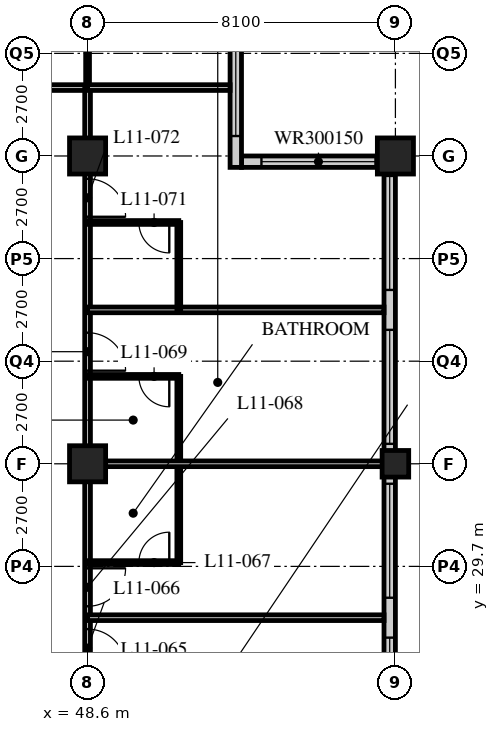
"""IFC4 building model, lengths in metres.
Left out: names, types, materials, properties, quantities, classifications, styles, units other than length and angle.
Written with IfcOpenShell. Run it as: python <this file> out.ifc"""

import sys

from ifc_helpers import new_model, si_unit, direction, frame, frame_2d, origin, origin_2d, place, context, subcontext, project, spatial, rectangle, hollow_rectangle, extrude, element, fill, save


model = new_model("IFC4")
c1 = context("Model", 3, precision=1e-05, world=origin(), true_north=direction((0.0, 1.0)))
c2 = subcontext(c1, "Body", "Model", "MODEL_VIEW")
j1 = project(units=[si_unit("LENGTHUNIT", "METRE"), si_unit("PLANEANGLEUNIT", "RADIAN")], contexts=[c1])
p1 = place(None, origin())
s1 = spatial("IfcSite", under=j1, at=p1, CompositionType="ELEMENT")
p2 = place(p1, origin())
s2 = spatial("IfcBuilding", under=s1, at=p2, CompositionType="ELEMENT")
p3 = place(p2, frame((0.0, 0.0, 50.0)))
s3 = spatial("IfcBuildingStorey", under=s2, at=p3, CompositionType="ELEMENT", Elevation=50.0)
for number, where, z_axis, x_axis in (
    (1, (48.6, 32.4, 0.0), (0.0, 0.0, 1.0), (1.0, 0.0, 0.0)),
    (2, (48.6, 40.5, 0.0), (0.0, 0.0, 1.0), (1.0, 0.0, 0.0)),
):
    element("IfcColumn", number, at=place(p3, frame(where, z_axis=z_axis, x_axis=x_axis)), inside=s3, PredefinedType="COLUMN", context=c2, shape_type="SweptSolid", body=[
        extrude(hollow_rectangle(XDim=0.95, YDim=0.95, WallThickness=0.095, at=origin_2d()), origin(), (0.0, 0.0, 1.0), 3.4),
    ])
p4 = place(p3, frame((56.7, 32.4, 0.0), z_axis=(0.0, 0.0, 1.0), x_axis=(1.0, 0.0, 0.0)))
e3 = element("IfcColumn", 3, at=p4, inside=s3, PredefinedType="COLUMN", context=c2, shape_type="SweptSolid", body=[
    extrude(hollow_rectangle(XDim=0.7, YDim=0.7, WallThickness=0.06, at=origin_2d()), origin(), (0.0, 0.0, 1.0), 3.4),
])
p5 = place(p3, frame((56.7, 40.5, 0.0), z_axis=(0.0, 0.0, 1.0), x_axis=(1.0, 0.0, 0.0)))
e4 = element("IfcColumn", 4, at=p5, inside=s3, PredefinedType="COLUMN", context=c2, shape_type="SweptSolid", body=[
    extrude(hollow_rectangle(XDim=0.95, YDim=0.95, WallThickness=0.095, at=origin_2d()), origin(), (0.0, 0.0, 1.0), 3.4),
])
p6 = place(p3, frame((56.55, 8.4, 0.0), z_axis=(0.0, 0.0, 1.0), x_axis=(0.0, 1.0, 0.0)))
e5 = element("IfcWall", 5, at=p6, inside=s3, PredefinedType="SOLIDWALL", context=c2, shape_type="SweptSolid", body=[
    extrude(rectangle(XDim=32.1, YDim=0.3, at=frame_2d((16.05, 0.0))), origin(), (0.0, 0.0, 1.0), 3.19),
])
p7 = place(p6, frame((0.225, 0.0, 0.9)))
e6 = element("IfcOpeningElement", 6, at=p7, cuts=e5, PredefinedType="OPENING", context=c2, shape_type="SweptSolid", body=[
    extrude(rectangle(XDim=3.0, YDim=2.0, at=frame_2d((1.5, 1.0))), frame((0.0, 0.16, 0.0), z_axis=(0.0, -1.0, 0.0), x_axis=(1.0, 0.0, 0.0)), (0.0, 0.0, 1.0), 0.32),
])
p8 = place(p6, frame((4.275, 0.0, 0.9)))
e7 = element("IfcOpeningElement", 7, at=p8, cuts=e5, PredefinedType="OPENING", context=c2, shape_type="SweptSolid", body=[
    extrude(rectangle(XDim=3.0, YDim=2.0, at=frame_2d((1.5, 1.0))), frame((0.0, 0.16, 0.0), z_axis=(0.0, -1.0, 0.0), x_axis=(1.0, 0.0, 0.0)), (0.0, 0.0, 1.0), 0.32),
])
p9 = place(p6, frame((8.325, 0.0, 0.9)))
e8 = element("IfcOpeningElement", 8, at=p9, cuts=e5, PredefinedType="OPENING", context=c2, shape_type="SweptSolid", body=[
    extrude(rectangle(XDim=3.0, YDim=2.0, at=frame_2d((1.5, 1.0))), frame((0.0, 0.16, 0.0), z_axis=(0.0, -1.0, 0.0), x_axis=(1.0, 0.0, 0.0)), (0.0, 0.0, 1.0), 0.32),
])
p10 = place(p6, frame((12.375, 0.0, 0.9)))
e9 = element("IfcOpeningElement", 9, at=p10, cuts=e5, PredefinedType="OPENING", context=c2, shape_type="SweptSolid", body=[
    extrude(rectangle(XDim=3.0, YDim=2.0, at=frame_2d((1.5, 1.0))), frame((0.0, 0.16, 0.0), z_axis=(0.0, -1.0, 0.0), x_axis=(1.0, 0.0, 0.0)), (0.0, 0.0, 1.0), 0.32),
])
p11 = place(p6, frame((16.425, 0.0, 0.9)))
e10 = element("IfcOpeningElement", 10, at=p11, cuts=e5, PredefinedType="OPENING", context=c2, shape_type="SweptSolid", body=[
    extrude(rectangle(XDim=3.0, YDim=2.0, at=frame_2d((1.5, 1.0))), frame((0.0, 0.16, 0.0), z_axis=(0.0, -1.0, 0.0), x_axis=(1.0, 0.0, 0.0)), (0.0, 0.0, 1.0), 0.32),
])
p12 = place(p6, frame((20.475, 0.0, 0.9)))
e11 = element("IfcOpeningElement", 11, at=p12, cuts=e5, PredefinedType="OPENING", context=c2, shape_type="SweptSolid", body=[
    extrude(rectangle(XDim=3.0, YDim=2.0, at=frame_2d((1.5, 1.0))), frame((0.0, 0.16, 0.0), z_axis=(0.0, -1.0, 0.0), x_axis=(1.0, 0.0, 0.0)), (0.0, 0.0, 1.0), 0.32),
])
p13 = place(p6, frame((24.525, 0.0, 0.9)))
e12 = element("IfcOpeningElement", 12, at=p13, cuts=e5, PredefinedType="OPENING", context=c2, shape_type="SweptSolid", body=[
    extrude(rectangle(XDim=3.0, YDim=2.0, at=frame_2d((1.5, 1.0))), frame((0.0, 0.16, 0.0), z_axis=(0.0, -1.0, 0.0), x_axis=(1.0, 0.0, 0.0)), (0.0, 0.0, 1.0), 0.32),
])
p14 = place(p6, frame((28.575, 0.0, 0.9)))
e13 = element("IfcOpeningElement", 13, at=p14, cuts=e5, PredefinedType="OPENING", context=c2, shape_type="SweptSolid", body=[
    extrude(rectangle(XDim=3.0, YDim=2.0, at=frame_2d((1.5, 1.0))), frame((0.0, 0.16, 0.0), z_axis=(0.0, -1.0, 0.0), x_axis=(1.0, 0.0, 0.0)), (0.0, 0.0, 1.0), 0.32),
])
p15 = place(p3, frame((56.4, 40.35, 0.0), z_axis=(0.0, 0.0, 1.0), x_axis=(-1.0, 0.0, 0.0)))
e14 = element("IfcWall", 14, at=p15, inside=s3, PredefinedType="SOLIDWALL", context=c2, shape_type="SweptSolid", body=[
    extrude(rectangle(XDim=3.75, YDim=0.3, at=frame_2d((1.875, 0.0))), origin(), (0.0, 0.0, 1.0), 3.19),
])
p16 = place(p15, frame((0.225, 0.0, 0.9)))
e15 = element("IfcOpeningElement", 15, at=p16, cuts=e14, PredefinedType="OPENING", context=c2, shape_type="SweptSolid", body=[
    extrude(rectangle(XDim=3.0, YDim=1.5, at=frame_2d((1.5, 0.75))), frame((0.0, 0.16, 0.0), z_axis=(0.0, -1.0, 0.0), x_axis=(1.0, 0.0, 0.0)), (0.0, 0.0, 1.0), 0.32),
])
p17 = place(p3, frame((52.5, 40.2, 0.0), z_axis=(0.0, 0.0, 1.0), x_axis=(0.0, 1.0, 0.0)))
e16 = element("IfcWall", 16, at=p17, inside=s3, PredefinedType="SOLIDWALL", context=c2, shape_type="SweptSolid", body=[
    extrude(rectangle(XDim=4.35, YDim=0.3, at=frame_2d((2.175, 0.0))), origin(), (0.0, 0.0, 1.0), 3.19),
])
p18 = place(p17, frame((0.825, 0.0, 0.9)))
e17 = element("IfcOpeningElement", 17, at=p18, cuts=e16, PredefinedType="OPENING", context=c2, shape_type="SweptSolid", body=[
    extrude(rectangle(XDim=3.0, YDim=1.5, at=frame_2d((1.5, 0.75))), frame((0.0, 0.16, 0.0), z_axis=(0.0, -1.0, 0.0), x_axis=(1.0, 0.0, 0.0)), (0.0, 0.0, 1.0), 0.32),
])
p19 = place(p3, frame((8.1, 42.3, 0.0), z_axis=(0.0, 0.0, 1.0), x_axis=(1.0, 0.0, 0.0)))
e18 = element("IfcWall", 18, at=p19, inside=s3, PredefinedType="PARTITIONING", context=c2, shape_type="SweptSolid", body=[
    extrude(rectangle(XDim=40.5, YDim=0.15, at=frame_2d((20.25, 0.0))), origin(), (0.0, 0.0, 1.0), 3.19),
])
p20 = place(p19, frame((6.5, 0.0, 0.0)))
e19 = element("IfcOpeningElement", 19, at=p20, cuts=e18, PredefinedType="OPENING", context=c2, shape_type="SweptSolid", body=[
    extrude(rectangle(XDim=1.0, YDim=2.1, at=frame_2d((0.5, 1.05))), frame((0.0, 0.085, 0.0), z_axis=(0.0, -1.0, 0.0), x_axis=(1.0, 0.0, 0.0)), (0.0, 0.0, 1.0), 0.17),
])
p21 = place(p19, frame((10.55, 0.0, 0.0)))
e20 = element("IfcOpeningElement", 20, at=p21, cuts=e18, PredefinedType="OPENING", context=c2, shape_type="SweptSolid", body=[
    extrude(rectangle(XDim=1.0, YDim=2.1, at=frame_2d((0.5, 1.05))), frame((0.0, 0.085, 0.0), z_axis=(0.0, -1.0, 0.0), x_axis=(1.0, 0.0, 0.0)), (0.0, 0.0, 1.0), 0.17),
])
p22 = place(p19, frame((14.6, 0.0, 0.0)))
e21 = element("IfcOpeningElement", 21, at=p22, cuts=e18, PredefinedType="OPENING", context=c2, shape_type="SweptSolid", body=[
    extrude(rectangle(XDim=1.0, YDim=2.1, at=frame_2d((0.5, 1.05))), frame((0.0, 0.085, 0.0), z_axis=(0.0, -1.0, 0.0), x_axis=(1.0, 0.0, 0.0)), (0.0, 0.0, 1.0), 0.17),
])
p23 = place(p19, frame((18.65, 0.0, 0.0)))
e22 = element("IfcOpeningElement", 22, at=p23, cuts=e18, PredefinedType="OPENING", context=c2, shape_type="SweptSolid", body=[
    extrude(rectangle(XDim=1.0, YDim=2.1, at=frame_2d((0.5, 1.05))), frame((0.0, 0.085, 0.0), z_axis=(0.0, -1.0, 0.0), x_axis=(1.0, 0.0, 0.0)), (0.0, 0.0, 1.0), 0.17),
])
p24 = place(p19, frame((22.7, 0.0, 0.0)))
e23 = element("IfcOpeningElement", 23, at=p24, cuts=e18, PredefinedType="OPENING", context=c2, shape_type="SweptSolid", body=[
    extrude(rectangle(XDim=1.0, YDim=2.1, at=frame_2d((0.5, 1.05))), frame((0.0, 0.085, 0.0), z_axis=(0.0, -1.0, 0.0), x_axis=(1.0, 0.0, 0.0)), (0.0, 0.0, 1.0), 0.17),
])
p25 = place(p19, frame((26.75, 0.0, 0.0)))
e24 = element("IfcOpeningElement", 24, at=p25, cuts=e18, PredefinedType="OPENING", context=c2, shape_type="SweptSolid", body=[
    extrude(rectangle(XDim=1.0, YDim=2.1, at=frame_2d((0.5, 1.05))), frame((0.0, 0.085, 0.0), z_axis=(0.0, -1.0, 0.0), x_axis=(1.0, 0.0, 0.0)), (0.0, 0.0, 1.0), 0.17),
])
p26 = place(p19, frame((30.8, 0.0, 0.0)))
e25 = element("IfcOpeningElement", 25, at=p26, cuts=e18, PredefinedType="OPENING", context=c2, shape_type="SweptSolid", body=[
    extrude(rectangle(XDim=1.0, YDim=2.1, at=frame_2d((0.5, 1.05))), frame((0.0, 0.085, 0.0), z_axis=(0.0, -1.0, 0.0), x_axis=(1.0, 0.0, 0.0)), (0.0, 0.0, 1.0), 0.17),
])
p27 = place(p19, frame((34.85, 0.0, 0.0)))
e26 = element("IfcOpeningElement", 26, at=p27, cuts=e18, PredefinedType="OPENING", context=c2, shape_type="SweptSolid", body=[
    extrude(rectangle(XDim=1.0, YDim=2.1, at=frame_2d((0.5, 1.05))), frame((0.0, 0.085, 0.0), z_axis=(0.0, -1.0, 0.0), x_axis=(1.0, 0.0, 0.0)), (0.0, 0.0, 1.0), 0.17),
])
p28 = place(p19, frame((36.875, 0.0, 0.0)))
e27 = element("IfcOpeningElement", 27, at=p28, cuts=e18, PredefinedType="OPENING", context=c2, shape_type="SweptSolid", body=[
    extrude(rectangle(XDim=1.0, YDim=2.1, at=frame_2d((0.5, 1.05))), frame((0.0, 0.085, 0.0), z_axis=(0.0, -1.0, 0.0), x_axis=(1.0, 0.0, 0.0)), (0.0, 0.0, 1.0), 0.17),
])
p29 = place(p19, frame((2.625, 0.0, 0.0)))
e28 = element("IfcOpeningElement", 28, at=p29, cuts=e18, PredefinedType="OPENING", context=c2, shape_type="SweptSolid", body=[
    extrude(rectangle(XDim=1.0, YDim=2.1, at=frame_2d((0.5, 1.05))), frame((0.0, 0.085, 0.0), z_axis=(0.0, -1.0, 0.0), x_axis=(1.0, 0.0, 0.0)), (0.0, 0.0, 1.0), 0.17),
])
p30 = place(p3, frame((48.6, 16.2, 0.0), z_axis=(0.0, 0.0, 1.0), x_axis=(0.0, 1.0, 0.0)))
e29 = element("IfcWall", 29, at=p30, inside=s3, PredefinedType="PARTITIONING", context=c2, shape_type="SweptSolid", body=[
    extrude(rectangle(XDim=26.1, YDim=0.15, at=frame_2d((13.05, 0.0))), origin(), (0.0, 0.0, 1.0), 2.578),
])
p31 = place(p30, frame((2.75, 0.0, 0.0)))
e30 = element("IfcOpeningElement", 30, at=p31, cuts=e29, PredefinedType="OPENING", context=c2, shape_type="SweptSolid", body=[
    extrude(rectangle(XDim=1.0, YDim=2.1, at=frame_2d((0.5, 1.05))), frame((0.0, 0.085, 0.0), z_axis=(0.0, -1.0, 0.0), x_axis=(1.0, 0.0, 0.0)), (0.0, 0.0, 1.0), 0.17),
])
p32 = place(p30, frame((4.35, 0.0, 0.0)))
e31 = element("IfcOpeningElement", 31, at=p32, cuts=e29, PredefinedType="OPENING", context=c2, shape_type="SweptSolid", body=[
    extrude(rectangle(XDim=1.0, YDim=2.1, at=frame_2d((0.5, 1.05))), frame((0.0, 0.085, 0.0), z_axis=(0.0, -1.0, 0.0), x_axis=(1.0, 0.0, 0.0)), (0.0, 0.0, 1.0), 0.17),
])
p33 = place(p30, frame((10.85, 0.0, 0.0)))
e32 = element("IfcOpeningElement", 32, at=p33, cuts=e29, PredefinedType="OPENING", context=c2, shape_type="SweptSolid", body=[
    extrude(rectangle(XDim=1.0, YDim=2.1, at=frame_2d((0.5, 1.05))), frame((0.0, 0.085, 0.0), z_axis=(0.0, -1.0, 0.0), x_axis=(1.0, 0.0, 0.0)), (0.0, 0.0, 1.0), 0.17),
])
p34 = place(p30, frame((12.45, 0.0, 0.0)))
e33 = element("IfcOpeningElement", 33, at=p34, cuts=e29, PredefinedType="OPENING", context=c2, shape_type="SweptSolid", body=[
    extrude(rectangle(XDim=1.0, YDim=2.1, at=frame_2d((0.5, 1.05))), frame((0.0, 0.085, 0.0), z_axis=(0.0, -1.0, 0.0), x_axis=(1.0, 0.0, 0.0)), (0.0, 0.0, 1.0), 0.17),
])
p35 = place(p30, frame((18.65, 0.0, 0.0)))
e34 = element("IfcOpeningElement", 34, at=p35, cuts=e29, PredefinedType="OPENING", context=c2, shape_type="SweptSolid", body=[
    extrude(rectangle(XDim=1.0, YDim=2.1, at=frame_2d((0.5, 1.05))), frame((0.0, 0.085, 0.0), z_axis=(0.0, -1.0, 0.0), x_axis=(1.0, 0.0, 0.0)), (0.0, 0.0, 1.0), 0.17),
])
p36 = place(p30, frame((22.7, 0.0, 0.0)))
e35 = element("IfcOpeningElement", 35, at=p36, cuts=e29, PredefinedType="OPENING", context=c2, shape_type="SweptSolid", body=[
    extrude(rectangle(XDim=1.0, YDim=2.1, at=frame_2d((0.5, 1.05))), frame((0.0, 0.085, 0.0), z_axis=(0.0, -1.0, 0.0), x_axis=(1.0, 0.0, 0.0)), (0.0, 0.0, 1.0), 0.17),
])
p37 = place(p3, frame((48.6, 28.35, 0.0), z_axis=(0.0, 0.0, 1.0), x_axis=(1.0, 0.0, 0.0)))
e36 = element("IfcWall", 36, at=p37, inside=s3, PredefinedType="PARTITIONING", context=c2, shape_type="SweptSolid", body=[
    extrude(rectangle(XDim=7.8, YDim=0.15, at=frame_2d((3.9, 0.0))), origin(), (0.0, 0.0, 1.0), 3.19),
])
p38 = place(p3, frame((51.0, 29.8, 0.0), z_axis=(0.0, 0.0, 1.0), x_axis=(0.0, 1.0, 0.0)))
e37 = element("IfcWall", 37, at=p38, inside=s3, PredefinedType="PARTITIONING", context=c2, shape_type="SweptSolid", body=[
    extrude(rectangle(XDim=4.9, YDim=0.1, at=frame_2d((2.45, 0.0))), origin(), (0.0, 0.0, 1.0), 3.19),
])
p39 = place(p3, frame((48.6, 29.8, 0.0), z_axis=(0.0, 0.0, 1.0), x_axis=(1.0, 0.0, 0.0)))
e38 = element("IfcWall", 38, at=p39, inside=s3, PredefinedType="PARTITIONING", context=c2, shape_type="SweptSolid", body=[
    extrude(rectangle(XDim=2.4, YDim=0.1, at=frame_2d((1.2, 0.0))), origin(), (0.0, 0.0, 1.0), 3.19),
])
p40 = place(p39, frame((1.35, 0.0, 0.0)))
e39 = element("IfcOpeningElement", 39, at=p40, cuts=e38, PredefinedType="OPENING", context=c2, shape_type="SweptSolid", body=[
    extrude(rectangle(XDim=0.8, YDim=2.1, at=frame_2d((0.4, 1.05))), frame((0.0, 0.06, 0.0), z_axis=(0.0, -1.0, 0.0), x_axis=(1.0, 0.0, 0.0)), (0.0, 0.0, 1.0), 0.12),
])
p41 = place(p3, frame((48.6, 32.4, 0.0), z_axis=(0.0, 0.0, 1.0), x_axis=(1.0, 0.0, 0.0)))
e40 = element("IfcWall", 40, at=p41, inside=s3, PredefinedType="PARTITIONING", context=c2, shape_type="SweptSolid", body=[
    extrude(rectangle(XDim=7.8, YDim=0.15, at=frame_2d((3.9, 0.0))), origin(), (0.0, 0.0, 1.0), 2.578),
])
p42 = place(p3, frame((48.6, 34.7, 0.0), z_axis=(0.0, 0.0, 1.0), x_axis=(1.0, 0.0, 0.0)))
e41 = element("IfcWall", 41, at=p42, inside=s3, PredefinedType="PARTITIONING", context=c2, shape_type="SweptSolid", body=[
    extrude(rectangle(XDim=2.4, YDim=0.1, at=frame_2d((1.2, 0.0))), origin(), (0.0, 0.0, 1.0), 3.19),
])
p43 = place(p42, frame((1.35, 0.0, 0.0)))
e42 = element("IfcOpeningElement", 42, at=p43, cuts=e41, PredefinedType="OPENING", context=c2, shape_type="SweptSolid", body=[
    extrude(rectangle(XDim=0.8, YDim=2.1, at=frame_2d((0.4, 1.05))), frame((0.0, 0.06, 0.0), z_axis=(0.0, -1.0, 0.0), x_axis=(1.0, 0.0, 0.0)), (0.0, 0.0, 1.0), 0.12),
])
p44 = place(p3, frame((48.6, 36.45, 0.0), z_axis=(0.0, 0.0, 1.0), x_axis=(1.0, 0.0, 0.0)))
e43 = element("IfcWall", 43, at=p44, inside=s3, PredefinedType="PARTITIONING", context=c2, shape_type="SweptSolid", body=[
    extrude(rectangle(XDim=7.8, YDim=0.15, at=frame_2d((3.9, 0.0))), origin(), (0.0, 0.0, 1.0), 3.19),
])
p45 = place(p3, frame((51.0, 36.45, 0.0), z_axis=(0.0, 0.0, 1.0), x_axis=(0.0, 1.0, 0.0)))
e44 = element("IfcWall", 44, at=p45, inside=s3, PredefinedType="PARTITIONING", context=c2, shape_type="SweptSolid", body=[
    extrude(rectangle(XDim=2.3, YDim=0.1, at=frame_2d((1.15, 0.0))), origin(), (0.0, 0.0, 1.0), 3.19),
])
p46 = place(p3, frame((48.6, 38.75, 0.0), z_axis=(0.0, 0.0, 1.0), x_axis=(1.0, 0.0, 0.0)))
e45 = element("IfcWall", 45, at=p46, inside=s3, PredefinedType="PARTITIONING", context=c2, shape_type="SweptSolid", body=[
    extrude(rectangle(XDim=2.4, YDim=0.1, at=frame_2d((1.2, 0.0))), origin(), (0.0, 0.0, 1.0), 3.19),
])
p47 = place(p46, frame((1.35, 0.0, 0.0)))
e46 = element("IfcOpeningElement", 46, at=p47, cuts=e45, PredefinedType="OPENING", context=c2, shape_type="SweptSolid", body=[
    extrude(rectangle(XDim=0.8, YDim=2.1, at=frame_2d((0.4, 1.05))), frame((0.0, 0.06, 0.0), z_axis=(0.0, -1.0, 0.0), x_axis=(1.0, 0.0, 0.0)), (0.0, 0.0, 1.0), 0.12),
])
p48 = place(p3, frame((48.6, 42.3, 0.0), z_axis=(0.0, 0.0, 1.0), x_axis=(0.0, 1.0, 0.0)))
e47 = element("IfcWall", 47, at=p48, inside=s3, PredefinedType="PARTITIONING", context=c2, shape_type="SweptSolid", body=[
    extrude(rectangle(XDim=1.95, YDim=0.1, at=frame_2d((0.975, 0.0))), origin(), (0.0, 0.0, 1.0), 2.578),
])
p49 = place(p3, frame((48.6, 42.3, 0.0), z_axis=(0.0, 0.0, 1.0), x_axis=(1.0, 0.0, 0.0)))
e48 = element("IfcWall", 48, at=p49, inside=s3, PredefinedType="PARTITIONING", context=c2, shape_type="SweptSolid", body=[
    extrude(rectangle(XDim=3.75, YDim=0.15, at=frame_2d((1.875, 0.0))), origin(), (0.0, 0.0, 1.0), 3.19),
])
p50 = place(p11, origin())
e49 = element("IfcWindow", 49, at=p50, inside=s3, PartitioningType="SINGLE_PANEL", PredefinedType="WINDOW", context=c2, shape_type="SweptSolid", body=[
    extrude(rectangle(XDim=3.0, YDim=2.0, at=frame_2d((1.5, 1.0))), frame((0.0, 0.03, 0.0), z_axis=(0.0, -1.0, 0.0), x_axis=(1.0, 0.0, 0.0)), (0.0, 0.0, 1.0), 0.06),
])
fill(e10, e49)
p51 = place(p12, origin())
e50 = element("IfcWindow", 50, at=p51, inside=s3, PartitioningType="SINGLE_PANEL", PredefinedType="WINDOW", context=c2, shape_type="SweptSolid", body=[
    extrude(rectangle(XDim=3.0, YDim=2.0, at=frame_2d((1.5, 1.0))), frame((0.0, 0.03, 0.0), z_axis=(0.0, -1.0, 0.0), x_axis=(1.0, 0.0, 0.0)), (0.0, 0.0, 1.0), 0.06),
])
fill(e11, e50)
p52 = place(p13, origin())
e51 = element("IfcWindow", 51, at=p52, inside=s3, PartitioningType="SINGLE_PANEL", PredefinedType="WINDOW", context=c2, shape_type="SweptSolid", body=[
    extrude(rectangle(XDim=3.0, YDim=2.0, at=frame_2d((1.5, 1.0))), frame((0.0, 0.03, 0.0), z_axis=(0.0, -1.0, 0.0), x_axis=(1.0, 0.0, 0.0)), (0.0, 0.0, 1.0), 0.06),
])
fill(e12, e51)
p53 = place(p14, origin())
e52 = element("IfcWindow", 52, at=p53, inside=s3, PartitioningType="SINGLE_PANEL", PredefinedType="WINDOW", context=c2, shape_type="SweptSolid", body=[
    extrude(rectangle(XDim=3.0, YDim=2.0, at=frame_2d((1.5, 1.0))), frame((0.0, 0.03, 0.0), z_axis=(0.0, -1.0, 0.0), x_axis=(1.0, 0.0, 0.0)), (0.0, 0.0, 1.0), 0.06),
])
fill(e13, e52)
p54 = place(p16, origin())
e53 = element("IfcWindow", 53, at=p54, inside=s3, PartitioningType="SINGLE_PANEL", PredefinedType="WINDOW", context=c2, shape_type="SweptSolid", body=[
    extrude(rectangle(XDim=3.0, YDim=1.5, at=frame_2d((1.5, 0.75))), frame((0.0, 0.03, 0.0), z_axis=(0.0, -1.0, 0.0), x_axis=(1.0, 0.0, 0.0)), (0.0, 0.0, 1.0), 0.06),
])
fill(e15, e53)
p55 = place(p18, origin())
e54 = element("IfcWindow", 54, at=p55, inside=s3, PartitioningType="SINGLE_PANEL", PredefinedType="WINDOW", context=c2, shape_type="SweptSolid", body=[
    extrude(rectangle(XDim=3.0, YDim=1.5, at=frame_2d((1.5, 0.75))), frame((0.0, 0.03, 0.0), z_axis=(0.0, -1.0, 0.0), x_axis=(1.0, 0.0, 0.0)), (0.0, 0.0, 1.0), 0.06),
])
fill(e17, e54)
p56 = place(p33, origin())
e55 = element("IfcDoor", 55, at=p56, inside=s3, OperationType="SINGLE_SWING_RIGHT", PredefinedType="DOOR", context=c2, shape_type="SweptSolid", body=[
    extrude(rectangle(XDim=1.0, YDim=2.1, at=frame_2d((0.5, 1.05))), frame((0.0, 0.025, 0.0), z_axis=(0.0, -1.0, 0.0), x_axis=(1.0, 0.0, 0.0)), (0.0, 0.0, 1.0), 0.05),
])
fill(e32, e55)
p57 = place(p40, origin())
e56 = element("IfcDoor", 56, at=p57, inside=s3, OperationType="SINGLE_SWING_RIGHT", PredefinedType="DOOR", context=c2, shape_type="SweptSolid", body=[
    extrude(rectangle(XDim=0.8, YDim=2.1, at=frame_2d((0.4, 1.05))), frame((0.0, 0.025, 0.0), z_axis=(0.0, -1.0, 0.0), x_axis=(1.0, 0.0, 0.0)), (0.0, 0.0, 1.0), 0.05),
])
fill(e39, e56)
p58 = place(p34, origin())
e57 = element("IfcDoor", 57, at=p58, inside=s3, OperationType="SINGLE_SWING_LEFT", PredefinedType="DOOR", context=c2, shape_type="SweptSolid", body=[
    extrude(rectangle(XDim=1.0, YDim=2.1, at=frame_2d((0.5, 1.05))), frame((0.0, 0.025, 0.0), z_axis=(0.0, -1.0, 0.0), x_axis=(1.0, 0.0, 0.0)), (0.0, 0.0, 1.0), 0.05),
])
fill(e33, e57)
p59 = place(p43, origin())
e58 = element("IfcDoor", 58, at=p59, inside=s3, OperationType="SINGLE_SWING_LEFT", PredefinedType="DOOR", context=c2, shape_type="SweptSolid", body=[
    extrude(rectangle(XDim=0.8, YDim=2.1, at=frame_2d((0.4, 1.05))), frame((0.0, 0.025, 0.0), z_axis=(0.0, -1.0, 0.0), x_axis=(1.0, 0.0, 0.0)), (0.0, 0.0, 1.0), 0.05),
])
fill(e42, e58)
p60 = place(p35, origin())
e59 = element("IfcDoor", 59, at=p60, inside=s3, OperationType="SINGLE_SWING_RIGHT", PredefinedType="DOOR", context=c2, shape_type="SweptSolid", body=[
    extrude(rectangle(XDim=1.0, YDim=2.1, at=frame_2d((0.5, 1.05))), frame((0.0, 0.025, 0.0), z_axis=(0.0, -1.0, 0.0), x_axis=(1.0, 0.0, 0.0)), (0.0, 0.0, 1.0), 0.05),
])
fill(e34, e59)
p61 = place(p47, origin())
e60 = element("IfcDoor", 60, at=p61, inside=s3, OperationType="SINGLE_SWING_LEFT", PredefinedType="DOOR", context=c2, shape_type="SweptSolid", body=[
    extrude(rectangle(XDim=0.8, YDim=2.1, at=frame_2d((0.4, 1.05))), frame((0.0, 0.025, 0.0), z_axis=(0.0, -1.0, 0.0), x_axis=(1.0, 0.0, 0.0)), (0.0, 0.0, 1.0), 0.05),
])
fill(e46, e60)
p62 = place(p36, origin())
e61 = element("IfcDoor", 61, at=p62, inside=s3, OperationType="SINGLE_SWING_RIGHT", PredefinedType="DOOR", context=c2, shape_type="SweptSolid", body=[
    extrude(rectangle(XDim=1.0, YDim=2.1, at=frame_2d((0.5, 1.05))), frame((0.0, 0.025, 0.0), z_axis=(0.0, -1.0, 0.0), x_axis=(1.0, 0.0, 0.0)), (0.0, 0.0, 1.0), 0.05),
])
fill(e35, e61)
save(model, sys.argv[1])
